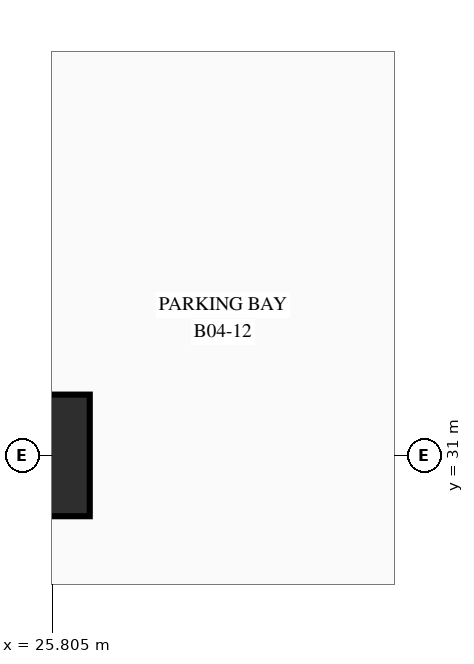
"""IFC4 building model, lengths in metres.
Left out: names, types, materials, properties, quantities, classifications, styles, units other than length and angle.
Written with IfcOpenShell. Run it as: python <this file> out.ifc"""

import sys

from ifc_helpers import new_model, si_unit, direction, frame, origin, origin_2d, place, context, subcontext, project, spatial, rectangle, extrude, element, save


model = new_model("IFC4")
c1 = context("Model", 3, precision=1e-05, world=origin(), true_north=direction((0.0, 1.0)))
c2 = subcontext(c1, "Body", "Model", "MODEL_VIEW")
j1 = project(units=[si_unit("LENGTHUNIT", "METRE"), si_unit("PLANEANGLEUNIT", "RADIAN")], contexts=[c1])
p1 = place(None, origin())
s1 = spatial("IfcSite", under=j1, at=p1, CompositionType="ELEMENT")
p2 = place(p1, origin())
s2 = spatial("IfcBuilding", under=s1, at=p2, CompositionType="ELEMENT")
p3 = place(p2, frame((0.0, 0.0, -18.0)))
s3 = spatial("IfcBuildingStorey", under=s2, at=p3, CompositionType="ELEMENT", Elevation=-18.0)
p4 = place(p3, frame((25.5, 31.0, 0.0), z_axis=(0.0, 0.0, 1.0), x_axis=(1.0, 0.0, 0.0)))
e1 = element("IfcColumn", 1, at=p4, inside=s3, PredefinedType="COLUMN", context=c2, shape_type="SweptSolid", body=[
    extrude(rectangle(XDim=1.6, YDim=1.6, at=origin_2d()), origin(), (0.0, 0.0, 1.0), 4.5),
])
save(model, sys.argv[1])
